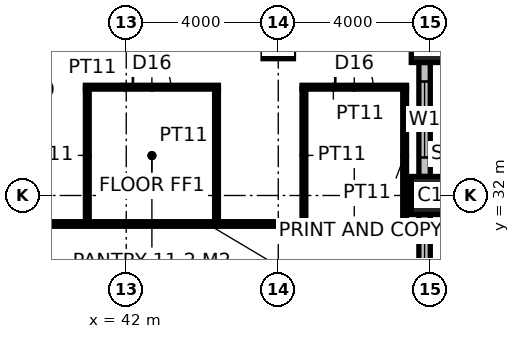
"""IFC4 building model, lengths in metres.
Left out: names, types, materials, properties, quantities, classifications, styles, units other than length and angle.
Written with IfcOpenShell. Run it as: python <this file> out.ifc"""

import sys

from ifc_helpers import new_model, si_unit, direction, frame, frame_2d, origin, origin_2d, place, context, subcontext, project, spatial, rectangle, hollow_rectangle, extrude, element, fill, save


model = new_model("IFC4")
c1 = context("Model", 3, precision=1e-05, world=origin(), true_north=direction((0.0, 1.0)))
c2 = subcontext(c1, "Body", "Model", "MODEL_VIEW")
j1 = project(units=[si_unit("LENGTHUNIT", "METRE"), si_unit("PLANEANGLEUNIT", "RADIAN")], contexts=[c1])
p1 = place(None, origin())
s1 = spatial("IfcSite", under=j1, at=p1, CompositionType="ELEMENT")
p2 = place(p1, origin())
s2 = spatial("IfcBuilding", under=s1, at=p2, CompositionType="ELEMENT")
p3 = place(p2, frame((0.0, 0.0, 230.2)))
s3 = spatial("IfcBuildingStorey", under=s2, at=p3, CompositionType="ELEMENT", Elevation=230.2)
for number, where, z_axis, x_axis in (
    (1, (50.0, 32.0, 0.0), (0.0, 0.0, 1.0), (1.0, 0.0, 0.0)),
    (2, (50.0, 36.0, 0.0), (0.0, 0.0, 1.0), (1.0, 0.0, 0.0)),
):
    element("IfcColumn", number, at=place(p3, frame(where, z_axis=z_axis, x_axis=x_axis)), inside=s3, PredefinedType="COLUMN", context=c2, shape_type="SweptSolid", body=[
        extrude(hollow_rectangle(XDim=1.0, YDim=1.0, WallThickness=0.1, at=origin_2d()), origin(), (0.0, 0.0, 1.0), 4.0),
    ])
p4 = place(p3, frame((46.0, 36.0, 0.0), z_axis=(0.0, 0.0, 1.0), x_axis=(1.0, 0.0, 0.0)))
e3 = element("IfcColumn", 3, at=p4, inside=s3, PredefinedType="COLUMN", context=c2, shape_type="SweptSolid", body=[
    extrude(hollow_rectangle(XDim=0.8, YDim=0.8, WallThickness=0.08, at=origin_2d()), origin(), (0.0, 0.0, 1.0), 4.0),
])
p5 = place(p3, frame((38.575, 31.25, 0.0), z_axis=(0.0, 0.0, 1.0), x_axis=(1.0, 0.0, 0.0)))
e4 = element("IfcWall", 4, at=p5, inside=s3, PredefinedType="PARTITIONING", context=c2, shape_type="SweptSolid", body=[
    extrude(rectangle(XDim=11.125, YDim=0.12, at=frame_2d((5.562, 0.0))), origin(), (0.0, 0.0, 1.0), 3.85),
])
p6 = place(p3, frame((40.925, 34.85, 0.0), z_axis=(0.0, 0.0, 1.0), x_axis=(1.0, 0.0, 0.0)))
e5 = element("IfcWall", 5, at=p6, inside=s3, PredefinedType="PARTITIONING", context=c2, shape_type="SweptSolid", body=[
    extrude(rectangle(XDim=3.5, YDim=0.1, at=frame_2d((1.75, 0.0))), origin(), (0.0, 0.0, 1.0), 3.85),
])
p7 = place(p6, frame((1.25, 0.0, 0.0)))
e6 = element("IfcOpeningElement", 6, at=p7, cuts=e5, PredefinedType="OPENING", context=c2, shape_type="SweptSolid", body=[
    extrude(rectangle(XDim=1.0, YDim=2.2, at=frame_2d((0.5, 1.1))), frame((0.0, 0.06, 0.0), z_axis=(0.0, -1.0, 0.0), x_axis=(1.0, 0.0, 0.0)), (0.0, 0.0, 1.0), 0.12),
])
p8 = place(p3, frame((46.625, 34.85, 0.0), z_axis=(0.0, 0.0, 1.0), x_axis=(1.0, 0.0, 0.0)))
e7 = element("IfcWall", 7, at=p8, inside=s3, PredefinedType="PARTITIONING", context=c2, shape_type="SweptSolid", body=[
    extrude(rectangle(XDim=2.75, YDim=0.1, at=frame_2d((1.375, 0.0))), origin(), (0.0, 0.0, 1.0), 3.85),
])
p9 = place(p8, frame((0.875, 0.0, 0.0)))
e8 = element("IfcOpeningElement", 8, at=p9, cuts=e7, PredefinedType="OPENING", context=c2, shape_type="SweptSolid", body=[
    extrude(rectangle(XDim=1.0, YDim=2.2, at=frame_2d((0.5, 1.1))), frame((0.0, 0.06, 0.0), z_axis=(0.0, -1.0, 0.0), x_axis=(1.0, 0.0, 0.0)), (0.0, 0.0, 1.0), 0.12),
])
for number, where, z_axis, x_axis in (
    (9, (40.975, 31.31, 0.0), (0.0, 0.0, 1.0), (0.0, 1.0, 0.0)),
    (10, (44.375, 31.31, 0.0), (0.0, 0.0, 1.0), (0.0, 1.0, 0.0)),
    (11, (46.675, 31.31, 0.0), (0.0, 0.0, 1.0), (0.0, 1.0, 0.0)),
    (12, (49.325, 31.31, 0.0), (0.0, 0.0, 1.0), (0.0, 1.0, 0.0)),
):
    element("IfcWall", number, at=place(p3, frame(where, z_axis=z_axis, x_axis=x_axis)), inside=s3, PredefinedType="PARTITIONING", context=c2, shape_type="SweptSolid", body=[
        extrude(rectangle(XDim=3.49, YDim=0.1, at=frame_2d((1.745, 0.0))), origin(), (0.0, 0.0, 1.0), 3.85),
    ])
p10 = place(p3, frame((49.85, 28.5, 0.0), z_axis=(0.0, 0.0, 1.0), x_axis=(0.0, 1.0, 0.0)))
e13 = element("IfcWall", 13, at=p10, inside=s3, PredefinedType="ELEMENTEDWALL", context=c2, shape_type="SweptSolid", body=[
    extrude(rectangle(XDim=3.0, YDim=0.3, at=frame_2d((1.5, 0.0))), origin(), (0.0, 0.0, 1.0), 2.85),
])
p11 = place(p10, frame((0.5, 0.0, 0.8)))
e14 = element("IfcOpeningElement", 14, at=p11, cuts=e13, PredefinedType="OPENING", context=c2, shape_type="SweptSolid", body=[
    extrude(rectangle(XDim=2.0, YDim=2.0, at=frame_2d((1.0, 1.0))), frame((0.0, 0.16, 0.0), z_axis=(0.0, -1.0, 0.0), x_axis=(1.0, 0.0, 0.0)), (0.0, 0.0, 1.0), 0.32),
])
p12 = place(p3, frame((49.85, 32.5, 0.0), z_axis=(0.0, 0.0, 1.0), x_axis=(0.0, 1.0, 0.0)))
e15 = element("IfcWall", 15, at=p12, inside=s3, PredefinedType="ELEMENTEDWALL", context=c2, shape_type="SweptSolid", body=[
    extrude(rectangle(XDim=3.0, YDim=0.3, at=frame_2d((1.5, 0.0))), origin(), (0.0, 0.0, 1.0), 2.85),
])
p13 = place(p12, frame((0.5, 0.0, 0.8)))
e16 = element("IfcOpeningElement", 16, at=p13, cuts=e15, PredefinedType="OPENING", context=c2, shape_type="SweptSolid", body=[
    extrude(rectangle(XDim=2.0, YDim=2.0, at=frame_2d((1.0, 1.0))), frame((0.0, 0.16, 0.0), z_axis=(0.0, -1.0, 0.0), x_axis=(1.0, 0.0, 0.0)), (0.0, 0.0, 1.0), 0.32),
])
p14 = place(p7, origin())
e17 = element("IfcDoor", 17, at=p14, inside=s3, OperationType="SINGLE_SWING_LEFT", PredefinedType="DOOR", context=c2, shape_type="SweptSolid", body=[
    extrude(rectangle(XDim=1.0, YDim=2.2, at=frame_2d((0.5, 1.1))), frame((0.0, 0.025, 0.0), z_axis=(0.0, -1.0, 0.0), x_axis=(1.0, 0.0, 0.0)), (0.0, 0.0, 1.0), 0.05),
])
fill(e6, e17)
p15 = place(p9, origin())
e18 = element("IfcDoor", 18, at=p15, inside=s3, OperationType="SINGLE_SWING_LEFT", PredefinedType="DOOR", context=c2, shape_type="SweptSolid", body=[
    extrude(rectangle(XDim=1.0, YDim=2.2, at=frame_2d((0.5, 1.1))), frame((0.0, 0.025, 0.0), z_axis=(0.0, -1.0, 0.0), x_axis=(1.0, 0.0, 0.0)), (0.0, 0.0, 1.0), 0.05),
])
fill(e8, e18)
p16 = place(p11, origin())
e19 = element("IfcWindow", 19, at=p16, inside=s3, PartitioningType="SINGLE_PANEL", PredefinedType="WINDOW", context=c2, shape_type="SweptSolid", body=[
    extrude(rectangle(XDim=2.0, YDim=2.0, at=frame_2d((1.0, 1.0))), frame((0.0, 0.03, 0.0), z_axis=(0.0, -1.0, 0.0), x_axis=(1.0, 0.0, 0.0)), (0.0, 0.0, 1.0), 0.06),
])
fill(e14, e19)
p17 = place(p13, origin())
e20 = element("IfcWindow", 20, at=p17, inside=s3, PartitioningType="SINGLE_PANEL", PredefinedType="WINDOW", context=c2, shape_type="SweptSolid", body=[
    extrude(rectangle(XDim=2.0, YDim=2.0, at=frame_2d((1.0, 1.0))), frame((0.0, 0.03, 0.0), z_axis=(0.0, -1.0, 0.0), x_axis=(1.0, 0.0, 0.0)), (0.0, 0.0, 1.0), 0.06),
])
fill(e16, e20)
save(model, sys.argv[1])
